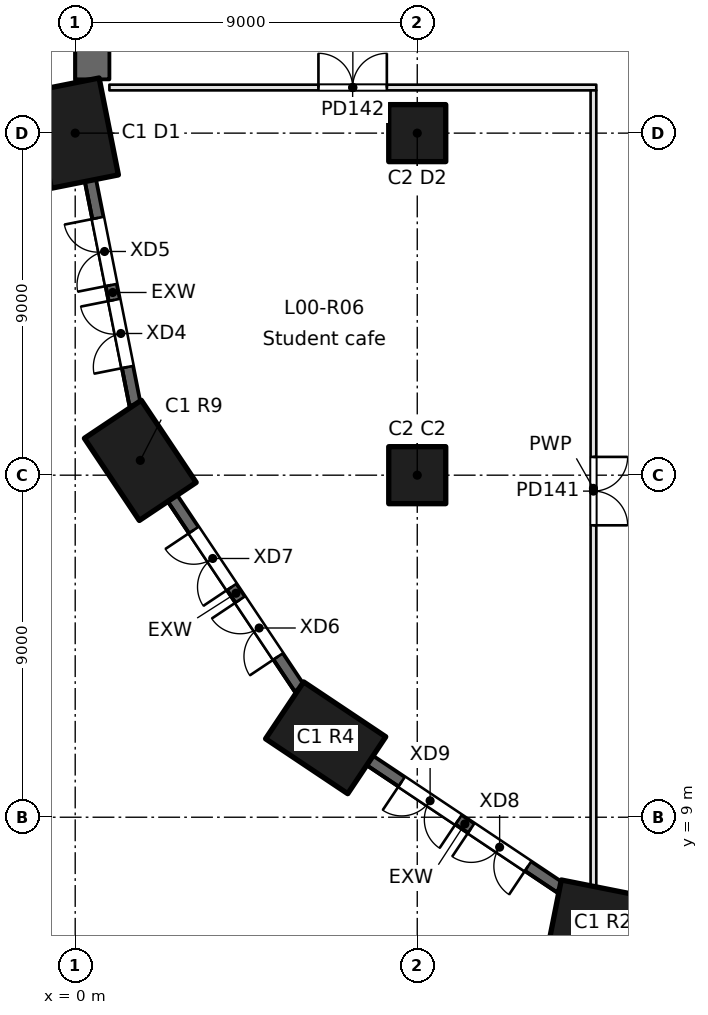
"""IFC4 building model, lengths in metres.
Left out: names, types, materials, properties, quantities, classifications, styles, units other than length and angle.
Written with IfcOpenShell. Run it as: python <this file> out.ifc"""

import sys

from ifc_helpers import new_model, si_unit, direction, frame, frame_2d, origin, origin_2d, place, context, subcontext, project, spatial, rectangle, extrude, element, fill, save


model = new_model("IFC4")
c1 = context("Model", 3, precision=1e-05, world=origin(), true_north=direction((0.0, 1.0)))
c2 = subcontext(c1, "Body", "Model", "MODEL_VIEW")
j1 = project(units=[si_unit("LENGTHUNIT", "METRE"), si_unit("PLANEANGLEUNIT", "RADIAN")], contexts=[c1])
p1 = place(None, origin())
s1 = spatial("IfcSite", under=j1, at=p1, CompositionType="ELEMENT")
p2 = place(p1, origin())
s2 = spatial("IfcBuilding", under=s1, at=p2, CompositionType="ELEMENT")
p3 = place(p2, origin())
s3 = spatial("IfcBuildingStorey", under=s2, at=p3, CompositionType="ELEMENT", Elevation=0.0)
for number, where, z_axis, x_axis in (
    (1, (13.89, 6.213, 0.0), (0.0, 0.0, 1.0), (-0.981, 0.195, 0.0)),
    (2, (6.59, 11.09, 0.0), (0.0, 0.0, 1.0), (-0.831, 0.556, 0.0)),
    (3, (1.713, 18.39, 0.0), (0.0, 0.0, 1.0), (-0.556, 0.831, 0.0)),
    (4, (0.0, 27.0, 0.0), (0.0, 0.0, 1.0), (-0.195, 0.981, 0.0)),
):
    element("IfcColumn", number, at=place(p3, frame(where, z_axis=z_axis, x_axis=x_axis)), inside=s3, PredefinedType="COLUMN", context=c2, shape_type="SweptSolid", body=[
        extrude(rectangle(XDim=2.6, YDim=1.8, at=origin_2d()), origin(), (0.0, 0.0, 1.0), 6.0),
    ])
for number, where, z_axis, x_axis in (
    (5, (9.0, 18.0, 0.0), (0.0, 0.0, 1.0), (1.0, 0.0, 0.0)),
    (6, (9.0, 27.0, 0.0), (0.0, 0.0, 1.0), (1.0, 0.0, 0.0)),
):
    element("IfcColumn", number, at=place(p3, frame(where, z_axis=z_axis, x_axis=x_axis)), inside=s3, PredefinedType="COLUMN", context=c2, shape_type="SweptSolid", body=[
        extrude(rectangle(XDim=1.5, YDim=1.5, at=origin_2d()), origin(), (0.0, 0.0, 1.0), 6.0),
    ])
p4 = place(p3, frame((0.45, 94.5, 0.0), z_axis=(0.0, 0.0, 1.0), x_axis=(0.0, -1.0, 0.0)))
e7 = element("IfcWall", 7, at=p4, inside=s3, PredefinedType="SHEAR", context=c2, shape_type="SweptSolid", body=[
    extrude(rectangle(XDim=66.085, YDim=0.9, at=frame_2d((33.042, 0.0))), origin(), (0.0, 0.0, 1.0), 6.0),
])
p5 = place(p4, frame((50.025, 0.0, 0.0)))
e8 = element("IfcOpeningElement", 8, at=p5, cuts=e7, PredefinedType="OPENING", context=c2, shape_type="SweptSolid", body=[
    extrude(rectangle(XDim=1.2, YDim=2.1, at=frame_2d((0.6, 1.05))), frame((0.0, 0.45, 0.0), z_axis=(0.0, -1.0, 0.0), x_axis=(1.0, 0.0, 0.0)), (0.0, 0.0, 1.0), 0.9),
])
p6 = place(p3, frame((1.573, 19.86, 0.0), z_axis=(0.0, 0.0, 1.0), x_axis=(-0.195116062951, 0.980780159862, 0.0)))
e9 = element("IfcWall", 9, at=p6, inside=s3, PredefinedType="SOLIDWALL", context=c2, shape_type="SweptSolid", body=[
    extrude(rectangle(XDim=6.01, YDim=0.3, at=frame_2d((3.005, 0.0))), origin(), (0.0, 0.0, 1.0), 5.65),
])
p7 = place(p6, frame((1.005, 0.0, 0.0)))
e10 = element("IfcOpeningElement", 10, at=p7, cuts=e9, PredefinedType="OPENING", context=c2, shape_type="SweptSolid", body=[
    extrude(rectangle(XDim=1.8, YDim=2.4, at=frame_2d((0.9, 1.2))), frame((0.0, 0.15, 0.0), z_axis=(0.0, -1.0, 0.0), x_axis=(1.0, 0.0, 0.0)), (0.0, 0.0, 1.0), 0.3),
])
p8 = place(p6, frame((3.205, 0.0, 0.0)))
e11 = element("IfcOpeningElement", 11, at=p8, cuts=e9, PredefinedType="OPENING", context=c2, shape_type="SweptSolid", body=[
    extrude(rectangle(XDim=1.8, YDim=2.4, at=frame_2d((0.9, 1.2))), frame((0.0, 0.15, 0.0), z_axis=(0.0, -1.0, 0.0), x_axis=(1.0, 0.0, 0.0)), (0.0, 0.0, 1.0), 0.3),
])
p9 = place(p3, frame((5.899, 12.395, 0.0), z_axis=(0.0, 0.0, 1.0), x_axis=(-0.555562359202, 0.831474873365, 0.0)))
e12 = element("IfcWall", 12, at=p9, inside=s3, PredefinedType="SOLIDWALL", context=c2, shape_type="SweptSolid", body=[
    extrude(rectangle(XDim=6.01, YDim=0.3, at=frame_2d((3.005, 0.0))), origin(), (0.0, 0.0, 1.0), 5.65),
])
p10 = place(p9, frame((1.005, 0.0, 0.0)))
e13 = element("IfcOpeningElement", 13, at=p10, cuts=e12, PredefinedType="OPENING", context=c2, shape_type="SweptSolid", body=[
    extrude(rectangle(XDim=1.8, YDim=2.4, at=frame_2d((0.9, 1.2))), frame((0.0, 0.15, 0.0), z_axis=(0.0, -1.0, 0.0), x_axis=(1.0, 0.0, 0.0)), (0.0, 0.0, 1.0), 0.3),
])
p11 = place(p9, frame((3.205, 0.0, 0.0)))
e14 = element("IfcOpeningElement", 14, at=p11, cuts=e12, PredefinedType="OPENING", context=c2, shape_type="SweptSolid", body=[
    extrude(rectangle(XDim=1.8, YDim=2.4, at=frame_2d((0.9, 1.2))), frame((0.0, 0.15, 0.0), z_axis=(0.0, -1.0, 0.0), x_axis=(1.0, 0.0, 0.0)), (0.0, 0.0, 1.0), 0.3),
])
p12 = place(p3, frame((12.751, 7.154, 0.0), z_axis=(0.0, 0.0, 1.0), x_axis=(-0.83146233441, 0.555581125001, 0.0)))
e15 = element("IfcWall", 15, at=p12, inside=s3, PredefinedType="SOLIDWALL", context=c2, shape_type="SweptSolid", body=[
    extrude(rectangle(XDim=6.01, YDim=0.3, at=frame_2d((3.005, 0.0))), origin(), (0.0, 0.0, 1.0), 5.65),
])
p13 = place(p12, frame((1.005, 0.0, 0.0)))
e16 = element("IfcOpeningElement", 16, at=p13, cuts=e15, PredefinedType="OPENING", context=c2, shape_type="SweptSolid", body=[
    extrude(rectangle(XDim=1.8, YDim=2.4, at=frame_2d((0.9, 1.2))), frame((0.0, 0.15, 0.0), z_axis=(0.0, -1.0, 0.0), x_axis=(1.0, 0.0, 0.0)), (0.0, 0.0, 1.0), 0.3),
])
p14 = place(p12, frame((3.205, 0.0, 0.0)))
e17 = element("IfcOpeningElement", 17, at=p14, cuts=e15, PredefinedType="OPENING", context=c2, shape_type="SweptSolid", body=[
    extrude(rectangle(XDim=1.8, YDim=2.4, at=frame_2d((0.9, 1.2))), frame((0.0, 0.15, 0.0), z_axis=(0.0, -1.0, 0.0), x_axis=(1.0, 0.0, 0.0)), (0.0, 0.0, 1.0), 0.3),
])
p15 = place(p3, frame((0.9, 28.2, 0.0), z_axis=(0.0, 0.0, 1.0), x_axis=(1.0, 0.0, 0.0)))
e18 = element("IfcWall", 18, at=p15, inside=s3, PredefinedType="PARTITIONING", context=c2, shape_type="SweptSolid", body=[
    extrude(rectangle(XDim=12.811, YDim=0.15, at=frame_2d((6.406, 0.0))), origin(), (0.0, 0.0, 1.0), 5.65),
])
p16 = place(p15, frame((5.5, 0.0, 0.0)))
e19 = element("IfcOpeningElement", 19, at=p16, cuts=e18, PredefinedType="OPENING", context=c2, shape_type="SweptSolid", body=[
    extrude(rectangle(XDim=1.8, YDim=2.1, at=frame_2d((0.9, 1.05))), frame((0.0, 0.075, 0.0), z_axis=(0.0, -1.0, 0.0), x_axis=(1.0, 0.0, 0.0)), (0.0, 0.0, 1.0), 0.15),
])
p17 = place(p3, frame((13.636, 28.125, 0.0), z_axis=(0.0, 0.0, 1.0), x_axis=(0.0, -1.0, 0.0)))
e20 = element("IfcWall", 20, at=p17, inside=s3, PredefinedType="PARTITIONING", context=c2, shape_type="SweptSolid", body=[
    extrude(rectangle(XDim=20.944, YDim=0.15, at=frame_2d((10.472, 0.0))), origin(), (0.0, 0.0, 1.0), 5.65),
])
p18 = place(p17, frame((9.644, 0.0, 0.0)))
e21 = element("IfcOpeningElement", 21, at=p18, cuts=e20, PredefinedType="OPENING", context=c2, shape_type="SweptSolid", body=[
    extrude(rectangle(XDim=1.8, YDim=2.1, at=frame_2d((0.9, 1.05))), frame((0.0, 0.075, 0.0), z_axis=(0.0, -1.0, 0.0), x_axis=(1.0, 0.0, 0.0)), (0.0, 0.0, 1.0), 0.15),
])
p19 = place(p7, origin())
e22 = element("IfcDoor", 22, at=p19, inside=s3, OperationType="DOUBLE_DOOR_SINGLE_SWING", PredefinedType="DOOR", context=c2, shape_type="SweptSolid", body=[
    extrude(rectangle(XDim=1.8, YDim=2.4, at=frame_2d((0.9, 1.2))), frame((0.0, 0.025, 0.0), z_axis=(0.0, -1.0, 0.0), x_axis=(1.0, 0.0, 0.0)), (0.0, 0.0, 1.0), 0.05),
])
fill(e10, e22)
p20 = place(p8, origin())
e23 = element("IfcDoor", 23, at=p20, inside=s3, OperationType="DOUBLE_DOOR_SINGLE_SWING", PredefinedType="DOOR", context=c2, shape_type="SweptSolid", body=[
    extrude(rectangle(XDim=1.8, YDim=2.4, at=frame_2d((0.9, 1.2))), frame((0.0, 0.025, 0.0), z_axis=(0.0, -1.0, 0.0), x_axis=(1.0, 0.0, 0.0)), (0.0, 0.0, 1.0), 0.05),
])
fill(e11, e23)
p21 = place(p10, origin())
e24 = element("IfcDoor", 24, at=p21, inside=s3, OperationType="DOUBLE_DOOR_SINGLE_SWING", PredefinedType="DOOR", context=c2, shape_type="SweptSolid", body=[
    extrude(rectangle(XDim=1.8, YDim=2.4, at=frame_2d((0.9, 1.2))), frame((0.0, 0.025, 0.0), z_axis=(0.0, -1.0, 0.0), x_axis=(1.0, 0.0, 0.0)), (0.0, 0.0, 1.0), 0.05),
])
fill(e13, e24)
p22 = place(p11, origin())
e25 = element("IfcDoor", 25, at=p22, inside=s3, OperationType="DOUBLE_DOOR_SINGLE_SWING", PredefinedType="DOOR", context=c2, shape_type="SweptSolid", body=[
    extrude(rectangle(XDim=1.8, YDim=2.4, at=frame_2d((0.9, 1.2))), frame((0.0, 0.025, 0.0), z_axis=(0.0, -1.0, 0.0), x_axis=(1.0, 0.0, 0.0)), (0.0, 0.0, 1.0), 0.05),
])
fill(e14, e25)
p23 = place(p13, origin())
e26 = element("IfcDoor", 26, at=p23, inside=s3, OperationType="DOUBLE_DOOR_SINGLE_SWING", PredefinedType="DOOR", context=c2, shape_type="SweptSolid", body=[
    extrude(rectangle(XDim=1.8, YDim=2.4, at=frame_2d((0.9, 1.2))), frame((0.0, 0.025, 0.0), z_axis=(0.0, -1.0, 0.0), x_axis=(1.0, 0.0, 0.0)), (0.0, 0.0, 1.0), 0.05),
])
fill(e16, e26)
p24 = place(p14, origin())
e27 = element("IfcDoor", 27, at=p24, inside=s3, OperationType="DOUBLE_DOOR_SINGLE_SWING", PredefinedType="DOOR", context=c2, shape_type="SweptSolid", body=[
    extrude(rectangle(XDim=1.8, YDim=2.4, at=frame_2d((0.9, 1.2))), frame((0.0, 0.025, 0.0), z_axis=(0.0, -1.0, 0.0), x_axis=(1.0, 0.0, 0.0)), (0.0, 0.0, 1.0), 0.05),
])
fill(e17, e27)
p25 = place(p18, origin())
e28 = element("IfcDoor", 28, at=p25, inside=s3, OperationType="DOUBLE_DOOR_SINGLE_SWING", PredefinedType="DOOR", context=c2, shape_type="SweptSolid", body=[
    extrude(rectangle(XDim=1.8, YDim=2.1, at=frame_2d((0.9, 1.05))), frame((0.0, 0.025, 0.0), z_axis=(0.0, -1.0, 0.0), x_axis=(1.0, 0.0, 0.0)), (0.0, 0.0, 1.0), 0.05),
])
fill(e21, e28)
p26 = place(p16, origin())
e29 = element("IfcDoor", 29, at=p26, inside=s3, OperationType="DOUBLE_DOOR_SINGLE_SWING", PredefinedType="DOOR", context=c2, shape_type="SweptSolid", body=[
    extrude(rectangle(XDim=1.8, YDim=2.1, at=frame_2d((0.9, 1.05))), frame((0.0, 0.025, 0.0), z_axis=(0.0, -1.0, 0.0), x_axis=(1.0, 0.0, 0.0)), (0.0, 0.0, 1.0), 0.05),
])
fill(e19, e29)
save(model, sys.argv[1])
